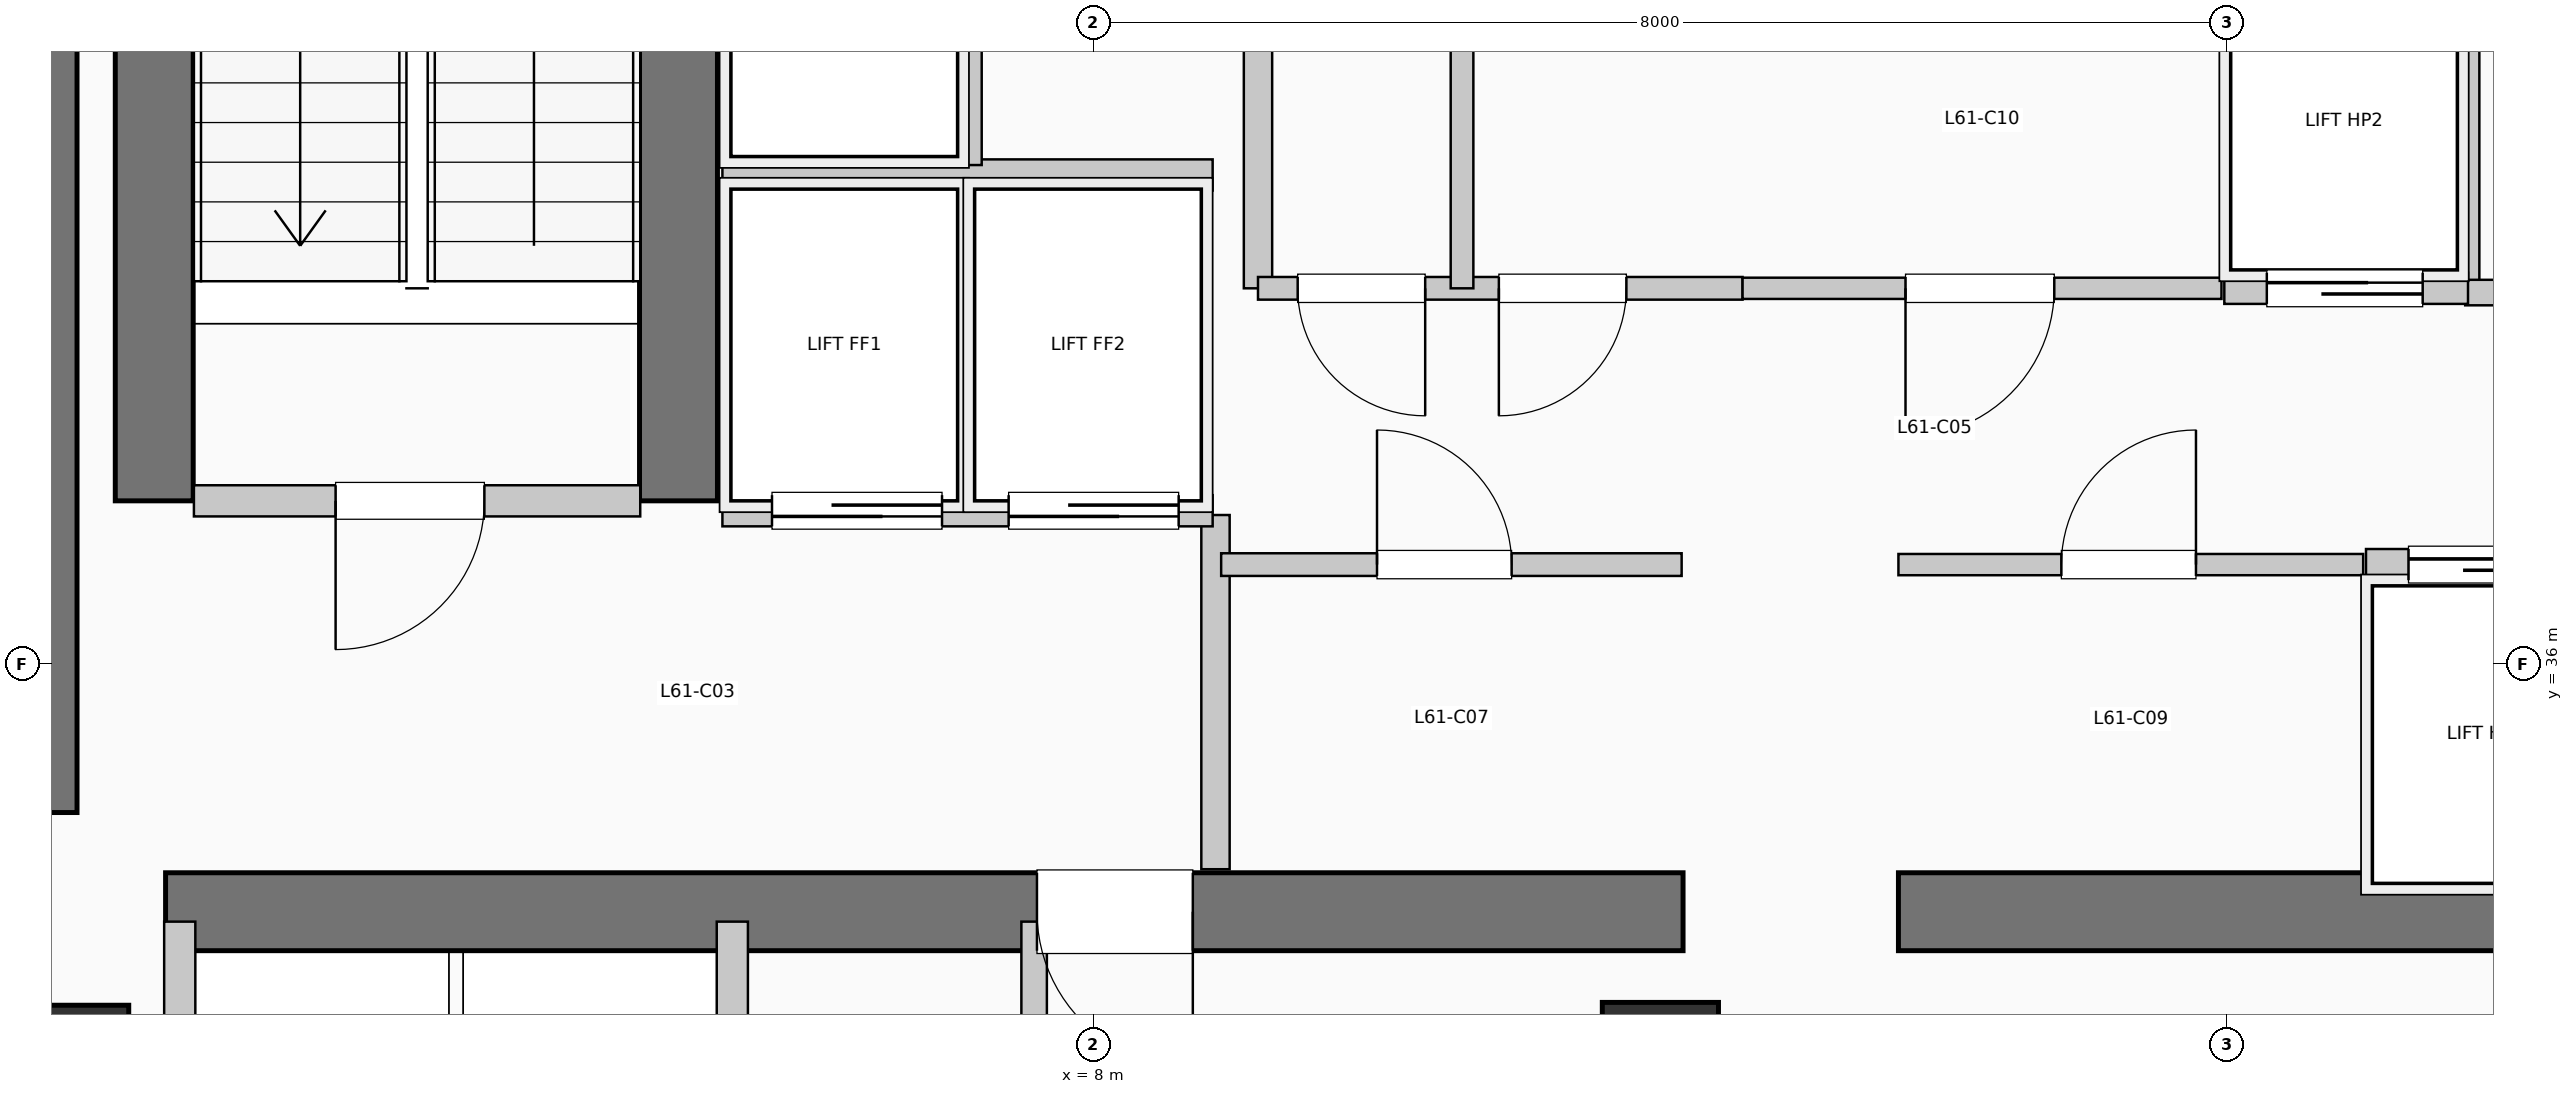
"""IFC4 building model, lengths in metres.
Left out: names, types, materials, properties, quantities, classifications, styles, units other than length and angle.
Written with IfcOpenShell. Run it as: python <this file> out.ifc"""

import sys

from ifc_helpers import new_model, si_unit, direction, frame, frame_2d, origin, origin_2d, place, context, subcontext, project, spatial, rectangle, extrude, element, fill, save


model = new_model("IFC4")
c1 = context("Model", 3, precision=1e-05, world=origin(), true_north=direction((0.0, 1.0)))
c2 = subcontext(c1, "Body", "Model", "MODEL_VIEW")
j1 = project(units=[si_unit("LENGTHUNIT", "METRE"), si_unit("PLANEANGLEUNIT", "RADIAN")], contexts=[c1])
p1 = place(None, origin())
s1 = spatial("IfcSite", under=j1, at=p1, CompositionType="ELEMENT")
p2 = place(p1, origin())
s2 = spatial("IfcBuilding", under=s1, at=p2, CompositionType="ELEMENT")
p3 = place(p2, frame((0.0, 0.0, 251.46)))
s3 = spatial("IfcBuildingStorey", under=s2, at=p3, CompositionType="ELEMENT", Elevation=251.46)
p4 = place(p3, frame((0.5, 34.95, 0.0), z_axis=(0.0, 0.0, 1.0), x_axis=(0.0, 1.0, 0.0)))
e1 = element("IfcWall", 1, at=p4, inside=s3, PredefinedType="SHEAR", context=c2, shape_type="SweptSolid", body=[
    extrude(rectangle(XDim=7.9, YDim=0.65, at=frame_2d((3.95, 0.0))), origin(), (0.0, 0.0, 1.0), 4.95),
])
p5 = place(p3, frame((1.45, 34.25, 0.0), z_axis=(0.0, 0.0, 1.0), x_axis=(1.0, 0.0, 0.0)))
e2 = element("IfcWall", 2, at=p5, inside=s3, PredefinedType="SHEAR", context=c2, shape_type="SweptSolid", body=[
    extrude(rectangle(XDim=10.71, YDim=0.55, at=frame_2d((5.355, 0.0))), origin(), (0.0, 0.0, 1.0), 4.95),
])
p6 = place(p5, frame((7.25, 0.0, 0.0), z_axis=(0.0, 0.0, 1.0), x_axis=(-1.0, 0.0, 0.0)))
e3 = element("IfcOpeningElement", 3, at=p6, cuts=e2, PredefinedType="OPENING", context=c2, shape_type="SweptSolid", body=[
    extrude(rectangle(XDim=1.1, YDim=2.15, at=frame_2d((0.55, 1.075))), frame((0.0, 0.285, 0.0), z_axis=(0.0, -1.0, 0.0), x_axis=(1.0, 0.0, 0.0)), (0.0, 0.0, 1.0), 0.57),
])
p7 = place(p3, frame((13.68, 34.25, 0.0), z_axis=(0.0, 0.0, 1.0), x_axis=(1.0, 0.0, 0.0)))
e4 = element("IfcWall", 4, at=p7, inside=s3, PredefinedType="SHEAR", context=c2, shape_type="SweptSolid", body=[
    extrude(rectangle(XDim=6.12, YDim=0.55, at=frame_2d((3.06, 0.0))), origin(), (0.0, 0.0, 1.0), 4.95),
])
for number, where, z_axis, x_axis in (
    (5, (1.37, 37.15, 0.0), (0.0, 0.0, 1.0), (0.0, 1.0, 0.0)),
    (6, (5.07, 37.15, 0.0), (0.0, 0.0, 1.0), (0.0, 1.0, 0.0)),
):
    element("IfcWall", number, at=place(p3, frame(where, z_axis=z_axis, x_axis=x_axis)), inside=s3, PredefinedType="SHEAR", context=c2, shape_type="SweptSolid", body=[
        extrude(rectangle(XDim=7.89, YDim=0.55, at=frame_2d((3.945, 0.0))), origin(), (0.0, 0.0, 1.0), 4.95),
    ])
p8 = place(p3, frame((0.8, 33.2, 0.0), z_axis=(0.0, 0.0, 1.0), x_axis=(1.0, 0.0, 0.0)))
e7 = element("IfcColumn", 7, at=p8, inside=s3, PredefinedType="COLUMN", context=c2, shape_type="SweptSolid", body=[
    extrude(rectangle(XDim=0.78, YDim=0.78, at=origin_2d()), origin(), (0.0, 0.0, 1.0), 4.95),
])
p9 = place(p3, frame((12.0, 33.2, 0.0), z_axis=(0.0, 0.0, 1.0), x_axis=(1.0, 0.0, 0.0)))
e8 = element("IfcColumn", 8, at=p9, inside=s3, PredefinedType="COLUMN", context=c2, shape_type="SweptSolid", body=[
    extrude(rectangle(XDim=0.82, YDim=0.82, at=origin_2d()), origin(), (0.0, 0.0, 1.0), 4.95),
])
p10 = place(p3, frame((1.65, 37.15, 0.0), z_axis=(0.0, 0.0, 1.0), x_axis=(1.0, 0.0, 0.0)))
e9 = element("IfcWall", 9, at=p10, inside=s3, PredefinedType="PARTITIONING", context=c2, shape_type="SweptSolid", body=[
    extrude(rectangle(XDim=3.15, YDim=0.22, at=frame_2d((1.575, 0.0))), origin(), (0.0, 0.0, 1.0), 4.7),
])
p11 = place(p10, frame((2.05, 0.0, 0.0), z_axis=(0.0, 0.0, 1.0), x_axis=(-1.0, 0.0, 0.0)))
e10 = element("IfcOpeningElement", 10, at=p11, cuts=e9, PredefinedType="OPENING", context=c2, shape_type="SweptSolid", body=[
    extrude(rectangle(XDim=1.05, YDim=2.15, at=frame_2d((0.525, 1.075))), frame((0.0, 0.12, 0.0), z_axis=(0.0, -1.0, 0.0), x_axis=(1.0, 0.0, 0.0)), (0.0, 0.0, 1.0), 0.24),
])
p12 = place(p3, frame((8.86, 34.55, 0.0), z_axis=(0.0, 0.0, 1.0), x_axis=(0.0, 1.0, 0.0)))
e11 = element("IfcWall", 11, at=p12, inside=s3, PredefinedType="PARTITIONING", context=c2, shape_type="SweptSolid", body=[
    extrude(rectangle(XDim=2.5, YDim=0.2, at=frame_2d((1.25, 0.0))), origin(), (0.0, 0.0, 1.0), 4.7),
])
p13 = place(p3, frame((5.38, 37.08, 0.0), z_axis=(0.0, 0.0, 1.0), x_axis=(1.0, 0.0, 0.0)))
e12 = element("IfcWall", 12, at=p13, inside=s3, PredefinedType="PARTITIONING", context=c2, shape_type="SweptSolid", body=[
    extrude(rectangle(XDim=3.46, YDim=0.22, at=frame_2d((1.73, 0.0))), origin(), (0.0, 0.0, 1.0), 4.7),
])
p14 = place(p13, frame((1.55, 0.0, 0.0), z_axis=(0.0, 0.0, 1.0), x_axis=(-1.0, 0.0, 0.0)))
e13 = element("IfcOpeningElement", 13, at=p14, cuts=e12, PredefinedType="OPENING", context=c2, shape_type="SweptSolid", body=[
    extrude(rectangle(XDim=1.2, YDim=2.2, at=frame_2d((0.6, 1.1))), frame((0.0, 0.12, 0.0), z_axis=(0.0, -1.0, 0.0), x_axis=(1.0, 0.0, 0.0)), (0.0, 0.0, 1.0), 0.24),
])
p15 = place(p13, frame((3.22, 0.0, 0.0), z_axis=(0.0, 0.0, 1.0), x_axis=(-1.0, 0.0, 0.0)))
e14 = element("IfcOpeningElement", 14, at=p15, cuts=e12, PredefinedType="OPENING", context=c2, shape_type="SweptSolid", body=[
    extrude(rectangle(XDim=1.2, YDim=2.2, at=frame_2d((0.6, 1.1))), frame((0.0, 0.12, 0.0), z_axis=(0.0, -1.0, 0.0), x_axis=(1.0, 0.0, 0.0)), (0.0, 0.0, 1.0), 0.24),
])
p16 = place(p3, frame((5.38, 39.45, 0.0), z_axis=(0.0, 0.0, 1.0), x_axis=(1.0, 0.0, 0.0)))
e15 = element("IfcWall", 15, at=p16, inside=s3, PredefinedType="PARTITIONING", context=c2, shape_type="SweptSolid", body=[
    extrude(rectangle(XDim=3.46, YDim=0.22, at=frame_2d((1.73, 0.0))), origin(), (0.0, 0.0, 1.0), 4.7),
])
p17 = place(p3, frame((7.1, 39.52, 0.0), z_axis=(0.0, 0.0, 1.0), x_axis=(0.0, 1.0, 0.0)))
e16 = element("IfcWall", 16, at=p17, inside=s3, PredefinedType="PARTITIONING", context=c2, shape_type="SweptSolid", body=[
    extrude(rectangle(XDim=2.93, YDim=0.22, at=frame_2d((1.465, 0.0))), origin(), (0.0, 0.0, 1.0), 4.7),
])
p18 = place(p17, frame((0.85, 0.0, 0.0)))
e17 = element("IfcOpeningElement", 17, at=p18, cuts=e16, PredefinedType="OPENING", context=c2, shape_type="SweptSolid", body=[
    extrude(rectangle(XDim=1.1, YDim=2.2, at=frame_2d((0.55, 1.1))), frame((0.0, 0.12, 0.0), z_axis=(0.0, -1.0, 0.0), x_axis=(1.0, 0.0, 0.0)), (0.0, 0.0, 1.0), 0.24),
])
for number, where, z_axis, x_axis in (
    (18, (1.55, 31.8, 0.0), (0.0, 0.0, 1.0), (0.0, 1.0, 0.0)),
    (19, (5.45, 31.8, 0.0), (0.0, 0.0, 1.0), (0.0, 1.0, 0.0)),
):
    element("IfcWall", number, at=place(p3, frame(where, z_axis=z_axis, x_axis=x_axis)), inside=s3, PredefinedType="PARTITIONING", context=c2, shape_type="SweptSolid", body=[
        extrude(rectangle(XDim=2.38, YDim=0.22, at=frame_2d((1.19, 0.0))), origin(), (0.0, 0.0, 1.0), 4.7),
    ])
for number, where, z_axis, x_axis in (
    (20, (9.16, 38.65, 0.0), (0.0, 0.0, 1.0), (0.0, 1.0, 0.0)),
    (21, (17.68, 38.65, 0.0), (0.0, 0.0, 1.0), (0.0, 1.0, 0.0)),
):
    element("IfcWall", number, at=place(p3, frame(where, z_axis=z_axis, x_axis=x_axis)), inside=s3, PredefinedType="PARTITIONING", context=c2, shape_type="SweptSolid", body=[
        extrude(rectangle(XDim=2.35, YDim=0.2, at=frame_2d((1.175, 0.0))), origin(), (0.0, 0.0, 1.0), 4.7),
    ])
p19 = place(p3, frame((17.68, 38.62, 0.0), z_axis=(0.0, 0.0, 1.0), x_axis=(1.0, 0.0, 0.0)))
e22 = element("IfcWall", 22, at=p19, inside=s3, PredefinedType="PARTITIONING", context=c2, shape_type="SweptSolid", body=[
    extrude(rectangle(XDim=1.84, YDim=0.18, at=frame_2d((0.92, 0.0))), origin(), (0.0, 0.0, 1.0), 4.7),
])
p20 = place(p19, frame((0.24, 0.0, 0.0)))
e23 = element("IfcOpeningElement", 23, at=p20, cuts=e22, PredefinedType="OPENING", context=c2, shape_type="SweptSolid", body=[
    extrude(rectangle(XDim=0.92, YDim=2.1, at=frame_2d((0.46, 1.05))), frame((0.0, 0.1, 0.0), z_axis=(0.0, -1.0, 0.0), x_axis=(1.0, 0.0, 0.0)), (0.0, 0.0, 1.0), 0.2),
])
p21 = place(p3, frame((7.58, 31.82, 0.0), z_axis=(0.0, 0.0, 1.0), x_axis=(0.0, 1.0, 0.0)))
e24 = element("IfcWall", 24, at=p21, inside=s3, PredefinedType="PLUMBINGWALL", context=c2, shape_type="SweptSolid", body=[
    extrude(rectangle(XDim=2.36, YDim=0.18, at=frame_2d((1.18, 0.0))), origin(), (0.0, 0.0, 1.0), 4.7),
])
p22 = place(p3, frame((8.9, 36.7, 0.0), z_axis=(0.0, 0.0, 1.0), x_axis=(1.0, 0.0, 0.0)))
e25 = element("IfcWall", 25, at=p22, inside=s3, PredefinedType="PARTITIONING", context=c2, shape_type="SweptSolid", body=[
    extrude(rectangle(XDim=3.25, YDim=0.16, at=frame_2d((1.625, 0.0))), origin(), (0.0, 0.0, 1.0), 4.7),
])
p23 = place(p22, frame((1.1, 0.0, 0.0)))
e26 = element("IfcOpeningElement", 26, at=p23, cuts=e25, PredefinedType="OPENING", context=c2, shape_type="SweptSolid", body=[
    extrude(rectangle(XDim=0.95, YDim=2.15, at=frame_2d((0.475, 1.075))), frame((0.0, 0.09, 0.0), z_axis=(0.0, -1.0, 0.0), x_axis=(1.0, 0.0, 0.0)), (0.0, 0.0, 1.0), 0.18),
])
p24 = place(p3, frame((9.16, 38.65, 0.0), z_axis=(0.0, 0.0, 1.0), x_axis=(1.0, 0.0, 0.0)))
e27 = element("IfcWall", 27, at=p24, inside=s3, PredefinedType="PARTITIONING", context=c2, shape_type="SweptSolid", body=[
    extrude(rectangle(XDim=3.42, YDim=0.16, at=frame_2d((1.71, 0.0))), origin(), (0.0, 0.0, 1.0), 4.7),
])
p25 = place(p24, frame((1.18, 0.0, 0.0), z_axis=(0.0, 0.0, 1.0), x_axis=(-1.0, 0.0, 0.0)))
e28 = element("IfcOpeningElement", 28, at=p25, cuts=e27, PredefinedType="OPENING", context=c2, shape_type="SweptSolid", body=[
    extrude(rectangle(XDim=0.9, YDim=2.15, at=frame_2d((0.45, 1.075))), frame((0.0, 0.09, 0.0), z_axis=(0.0, -1.0, 0.0), x_axis=(1.0, 0.0, 0.0)), (0.0, 0.0, 1.0), 0.18),
])
p26 = place(p24, frame((2.6, 0.0, 0.0), z_axis=(0.0, 0.0, 1.0), x_axis=(-1.0, 0.0, 0.0)))
e29 = element("IfcOpeningElement", 29, at=p26, cuts=e27, PredefinedType="OPENING", context=c2, shape_type="SweptSolid", body=[
    extrude(rectangle(XDim=0.9, YDim=2.15, at=frame_2d((0.45, 1.075))), frame((0.0, 0.09, 0.0), z_axis=(0.0, -1.0, 0.0), x_axis=(1.0, 0.0, 0.0)), (0.0, 0.0, 1.0), 0.18),
])
p27 = place(p3, frame((10.6, 38.65, 0.0), z_axis=(0.0, 0.0, 1.0), x_axis=(0.0, 1.0, 0.0)))
e30 = element("IfcWall", 30, at=p27, inside=s3, PredefinedType="PARTITIONING", context=c2, shape_type="SweptSolid", body=[
    extrude(rectangle(XDim=2.35, YDim=0.16, at=frame_2d((1.175, 0.0))), origin(), (0.0, 0.0, 1.0), 4.7),
])
p28 = place(p3, frame((13.68, 36.7, 0.0), z_axis=(0.0, 0.0, 1.0), x_axis=(1.0, 0.0, 0.0)))
e31 = element("IfcWall", 31, at=p28, inside=s3, PredefinedType="PARTITIONING", context=c2, shape_type="SweptSolid", body=[
    extrude(rectangle(XDim=3.28, YDim=0.15, at=frame_2d((1.64, 0.0))), origin(), (0.0, 0.0, 1.0), 4.7),
])
p29 = place(p28, frame((1.15, 0.0, 0.0)))
e32 = element("IfcOpeningElement", 32, at=p29, cuts=e31, PredefinedType="OPENING", context=c2, shape_type="SweptSolid", body=[
    extrude(rectangle(XDim=0.95, YDim=2.15, at=frame_2d((0.475, 1.075))), frame((0.0, 0.085, 0.0), z_axis=(0.0, -1.0, 0.0), x_axis=(1.0, 0.0, 0.0)), (0.0, 0.0, 1.0), 0.17),
])
p30 = place(p3, frame((12.58, 38.65, 0.0), z_axis=(0.0, 0.0, 1.0), x_axis=(1.0, 0.0, 0.0)))
e33 = element("IfcWall", 33, at=p30, inside=s3, PredefinedType="PARTITIONING", context=c2, shape_type="SweptSolid", body=[
    extrude(rectangle(XDim=3.38, YDim=0.15, at=frame_2d((1.69, 0.0))), origin(), (0.0, 0.0, 1.0), 4.7),
])
p31 = place(p30, frame((2.2, 0.0, 0.0), z_axis=(0.0, 0.0, 1.0), x_axis=(-1.0, 0.0, 0.0)))
e34 = element("IfcOpeningElement", 34, at=p31, cuts=e33, PredefinedType="OPENING", context=c2, shape_type="SweptSolid", body=[
    extrude(rectangle(XDim=1.05, YDim=2.15, at=frame_2d((0.525, 1.075))), frame((0.0, 0.085, 0.0), z_axis=(0.0, -1.0, 0.0), x_axis=(1.0, 0.0, 0.0)), (0.0, 0.0, 1.0), 0.17),
])
p32 = place(p3, frame((16.98, 36.7, 0.0), z_axis=(0.0, 0.0, 1.0), x_axis=(1.0, 0.0, 0.0)))
e35 = element("IfcWall", 35, at=p32, inside=s3, PredefinedType="PARTITIONING", context=c2, shape_type="SweptSolid", body=[
    extrude(rectangle(XDim=1.7, YDim=0.22, at=frame_2d((0.85, 0.0))), origin(), (0.0, 0.0, 1.0), 4.7),
])
p33 = place(p32, frame((0.3, 0.0, 0.0)))
e36 = element("IfcOpeningElement", 36, at=p33, cuts=e35, PredefinedType="OPENING", context=c2, shape_type="SweptSolid", body=[
    extrude(rectangle(XDim=1.1, YDim=2.2, at=frame_2d((0.55, 1.1))), frame((0.0, 0.12, 0.0), z_axis=(0.0, -1.0, 0.0), x_axis=(1.0, 0.0, 0.0)), (0.0, 0.0, 1.0), 0.24),
])
p34 = place(p3, frame((15.98, 38.65, 0.0), z_axis=(0.0, 0.0, 1.0), x_axis=(1.0, 0.0, 0.0)))
e37 = element("IfcWall", 37, at=p34, inside=s3, PredefinedType="PARTITIONING", context=c2, shape_type="SweptSolid", body=[
    extrude(rectangle(XDim=1.72, YDim=0.22, at=frame_2d((0.86, 0.0))), origin(), (0.0, 0.0, 1.0), 4.7),
])
p35 = place(p34, frame((0.3, 0.0, 0.0)))
e38 = element("IfcOpeningElement", 38, at=p35, cuts=e37, PredefinedType="OPENING", context=c2, shape_type="SweptSolid", body=[
    extrude(rectangle(XDim=1.1, YDim=2.2, at=frame_2d((0.55, 1.1))), frame((0.0, 0.12, 0.0), z_axis=(0.0, -1.0, 0.0), x_axis=(1.0, 0.0, 0.0)), (0.0, 0.0, 1.0), 0.24),
])
p36 = place(p11, origin())
e39 = element("IfcDoor", 39, at=p36, inside=s3, OperationType="SINGLE_SWING_LEFT", PredefinedType="DOOR", context=c2, shape_type="SweptSolid", body=[
    extrude(rectangle(XDim=1.05, YDim=2.15, at=frame_2d((0.525, 1.075))), frame((0.0, 0.025, 0.0), z_axis=(0.0, -1.0, 0.0), x_axis=(1.0, 0.0, 0.0)), (0.0, 0.0, 1.0), 0.05),
])
fill(e10, e39)
p37 = place(p6, origin())
e40 = element("IfcDoor", 40, at=p37, inside=s3, OperationType="SINGLE_SWING_RIGHT", PredefinedType="DOOR", context=c2, shape_type="SweptSolid", body=[
    extrude(rectangle(XDim=1.1, YDim=2.15, at=frame_2d((0.55, 1.075))), frame((0.0, 0.025, 0.0), z_axis=(0.0, -1.0, 0.0), x_axis=(1.0, 0.0, 0.0)), (0.0, 0.0, 1.0), 0.05),
])
fill(e3, e40)
p38 = place(p14, origin())
e41 = element("IfcDoor", 41, at=p38, inside=s3, OperationType="SLIDING_TO_RIGHT", PredefinedType="DOOR", context=c2, shape_type="SweptSolid", body=[
    extrude(rectangle(XDim=1.2, YDim=2.2, at=frame_2d((0.6, 1.1))), frame((0.0, 0.025, 0.0), z_axis=(0.0, -1.0, 0.0), x_axis=(1.0, 0.0, 0.0)), (0.0, 0.0, 1.0), 0.05),
])
fill(e13, e41)
p39 = place(p15, origin())
e42 = element("IfcDoor", 42, at=p39, inside=s3, OperationType="SLIDING_TO_RIGHT", PredefinedType="DOOR", context=c2, shape_type="SweptSolid", body=[
    extrude(rectangle(XDim=1.2, YDim=2.2, at=frame_2d((0.6, 1.1))), frame((0.0, 0.025, 0.0), z_axis=(0.0, -1.0, 0.0), x_axis=(1.0, 0.0, 0.0)), (0.0, 0.0, 1.0), 0.05),
])
fill(e14, e42)
p40 = place(p23, origin())
e43 = element("IfcDoor", 43, at=p40, inside=s3, OperationType="SINGLE_SWING_LEFT", PredefinedType="DOOR", context=c2, shape_type="SweptSolid", body=[
    extrude(rectangle(XDim=0.95, YDim=2.15, at=frame_2d((0.475, 1.075))), frame((0.0, 0.025, 0.0), z_axis=(0.0, -1.0, 0.0), x_axis=(1.0, 0.0, 0.0)), (0.0, 0.0, 1.0), 0.05),
])
fill(e26, e43)
p41 = place(p25, origin())
e44 = element("IfcDoor", 44, at=p41, inside=s3, OperationType="SINGLE_SWING_RIGHT", PredefinedType="DOOR", context=c2, shape_type="SweptSolid", body=[
    extrude(rectangle(XDim=0.9, YDim=2.15, at=frame_2d((0.45, 1.075))), frame((0.0, 0.025, 0.0), z_axis=(0.0, -1.0, 0.0), x_axis=(1.0, 0.0, 0.0)), (0.0, 0.0, 1.0), 0.05),
])
fill(e28, e44)
p42 = place(p26, origin())
e45 = element("IfcDoor", 45, at=p42, inside=s3, OperationType="SINGLE_SWING_LEFT", PredefinedType="DOOR", context=c2, shape_type="SweptSolid", body=[
    extrude(rectangle(XDim=0.9, YDim=2.15, at=frame_2d((0.45, 1.075))), frame((0.0, 0.025, 0.0), z_axis=(0.0, -1.0, 0.0), x_axis=(1.0, 0.0, 0.0)), (0.0, 0.0, 1.0), 0.05),
])
fill(e29, e45)
p43 = place(p29, origin())
e46 = element("IfcDoor", 46, at=p43, inside=s3, OperationType="SINGLE_SWING_RIGHT", PredefinedType="DOOR", context=c2, shape_type="SweptSolid", body=[
    extrude(rectangle(XDim=0.95, YDim=2.15, at=frame_2d((0.475, 1.075))), frame((0.0, 0.025, 0.0), z_axis=(0.0, -1.0, 0.0), x_axis=(1.0, 0.0, 0.0)), (0.0, 0.0, 1.0), 0.05),
])
fill(e32, e46)
p44 = place(p31, origin())
e47 = element("IfcDoor", 47, at=p44, inside=s3, OperationType="SINGLE_SWING_LEFT", PredefinedType="DOOR", context=c2, shape_type="SweptSolid", body=[
    extrude(rectangle(XDim=1.05, YDim=2.15, at=frame_2d((0.525, 1.075))), frame((0.0, 0.025, 0.0), z_axis=(0.0, -1.0, 0.0), x_axis=(1.0, 0.0, 0.0)), (0.0, 0.0, 1.0), 0.05),
])
fill(e34, e47)
p45 = place(p33, origin())
e48 = element("IfcDoor", 48, at=p45, inside=s3, OperationType="SLIDING_TO_LEFT", PredefinedType="DOOR", context=c2, shape_type="SweptSolid", body=[
    extrude(rectangle(XDim=1.1, YDim=2.2, at=frame_2d((0.55, 1.1))), frame((0.0, 0.025, 0.0), z_axis=(0.0, -1.0, 0.0), x_axis=(1.0, 0.0, 0.0)), (0.0, 0.0, 1.0), 0.05),
])
fill(e36, e48)
p46 = place(p35, origin())
e49 = element("IfcDoor", 49, at=p46, inside=s3, OperationType="SLIDING_TO_LEFT", PredefinedType="DOOR", context=c2, shape_type="SweptSolid", body=[
    extrude(rectangle(XDim=1.1, YDim=2.2, at=frame_2d((0.55, 1.1))), frame((0.0, 0.025, 0.0), z_axis=(0.0, -1.0, 0.0), x_axis=(1.0, 0.0, 0.0)), (0.0, 0.0, 1.0), 0.05),
])
fill(e38, e49)
save(model, sys.argv[1])
